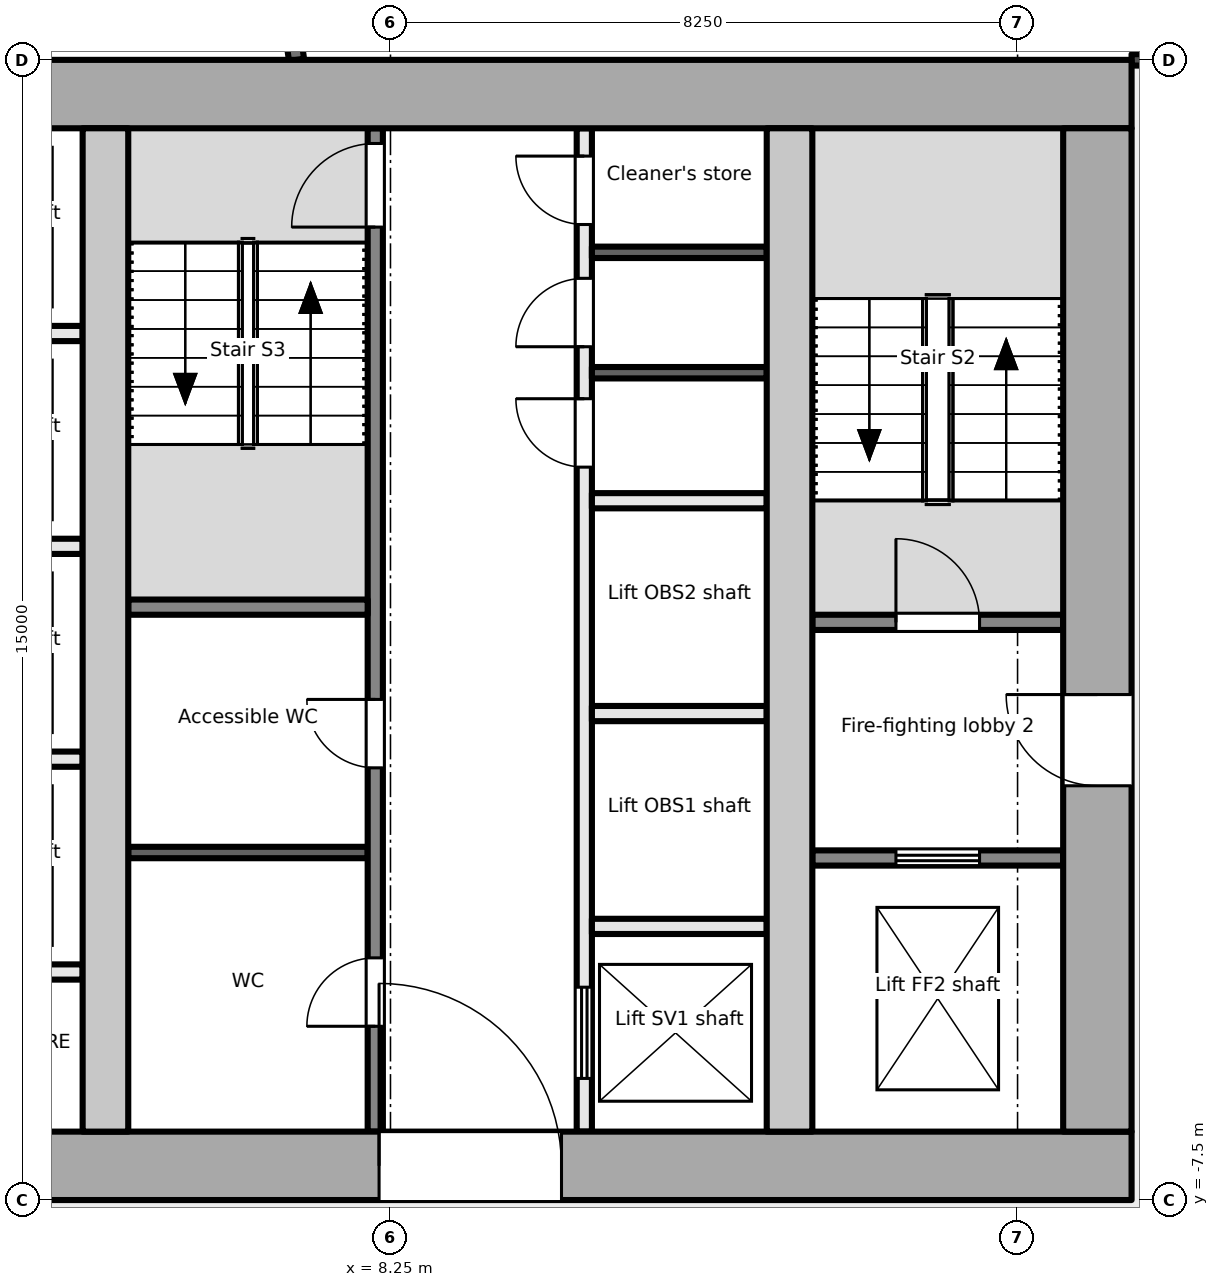
"""IFC4 building model, lengths in metres.
Left out: names, types, materials, properties, quantities, classifications, styles, units other than length and angle.
Written with IfcOpenShell. Run it as: python <this file> out.ifc"""

import sys

from ifc_helpers import new_model, si_unit, direction, frame, frame_2d, origin, place, context, subcontext, project, spatial, rectangle, extrude, element, fill, save


model = new_model("IFC4")
c1 = context("Model", 3, precision=1e-05, world=origin(), true_north=direction((0.0, 1.0)))
c2 = subcontext(c1, "Body", "Model", "MODEL_VIEW")
j1 = project(units=[si_unit("LENGTHUNIT", "METRE"), si_unit("PLANEANGLEUNIT", "RADIAN")], contexts=[c1])
p1 = place(None, origin())
s1 = spatial("IfcSite", under=j1, at=p1, CompositionType="ELEMENT")
p2 = place(p1, origin())
s2 = spatial("IfcBuilding", under=s1, at=p2, CompositionType="ELEMENT")
p3 = place(p2, frame((0.0, 0.0, 249.7)))
s3 = spatial("IfcBuildingStorey", under=s2, at=p3, CompositionType="ELEMENT", Elevation=249.7)
p4 = place(p3, frame((-18.0, -7.05, -0.2), z_axis=(0.0, 0.0, 1.0), x_axis=(1.0, 0.0, 0.0)))
e1 = element("IfcWall", 1, at=p4, inside=s3, PredefinedType="SHEAR", context=c2, shape_type="SweptSolid", body=[
    extrude(rectangle(XDim=36.0, YDim=0.9, at=frame_2d((18.0, 0.0))), origin(), (0.0, 0.0, 1.0), 5.4),
])
p5 = place(p4, frame((4.9, 0.0, 0.2)))
e2 = element("IfcOpeningElement", 2, at=p5, cuts=e1, PredefinedType="OPENING", context=c2, shape_type="SweptSolid", body=[
    extrude(rectangle(XDim=1.8, YDim=2.1, at=frame_2d((0.9, 1.05))), frame((0.0, 0.46, 0.0), z_axis=(0.0, -1.0, 0.0), x_axis=(1.0, 0.0, 0.0)), (0.0, 0.0, 1.0), 0.921),
])
p6 = place(p4, frame((16.8, 0.0, 0.2)))
e3 = element("IfcOpeningElement", 3, at=p6, cuts=e1, PredefinedType="OPENING", context=c2, shape_type="SweptSolid", body=[
    extrude(rectangle(XDim=2.4, YDim=2.1, at=frame_2d((1.2, 1.05))), frame((0.0, 0.46, 0.0), z_axis=(0.0, -1.0, 0.0), x_axis=(1.0, 0.0, 0.0)), (0.0, 0.0, 1.0), 0.921),
])
p7 = place(p4, frame((26.1, 0.0, 0.2)))
e4 = element("IfcOpeningElement", 4, at=p7, cuts=e1, PredefinedType="OPENING", context=c2, shape_type="SweptSolid", body=[
    extrude(rectangle(XDim=2.4, YDim=2.1, at=frame_2d((1.2, 1.05))), frame((0.0, 0.46, 0.0), z_axis=(0.0, -1.0, 0.0), x_axis=(1.0, 0.0, 0.0)), (0.0, 0.0, 1.0), 0.921),
])
p8 = place(p3, frame((-18.0, 7.05, -0.2), z_axis=(0.0, 0.0, 1.0), x_axis=(1.0, 0.0, 0.0)))
e5 = element("IfcWall", 5, at=p8, inside=s3, PredefinedType="SHEAR", context=c2, shape_type="SweptSolid", body=[
    extrude(rectangle(XDim=36.0, YDim=0.9, at=frame_2d((18.0, 0.0))), origin(), (0.0, 0.0, 1.0), 5.4),
])
p9 = place(p3, frame((17.55, -6.6, -0.2), z_axis=(0.0, 0.0, 1.0), x_axis=(0.0, 1.0, 0.0)))
e6 = element("IfcWall", 6, at=p9, inside=s3, PredefinedType="SHEAR", context=c2, shape_type="SweptSolid", body=[
    extrude(rectangle(XDim=13.2, YDim=0.9, at=frame_2d((6.6, 0.0))), origin(), (0.0, 0.0, 1.0), 5.4),
])
p10 = place(p9, frame((4.55, 0.0, 0.2)))
e7 = element("IfcOpeningElement", 7, at=p10, cuts=e6, PredefinedType="OPENING", context=c2, shape_type="SweptSolid", body=[
    extrude(rectangle(XDim=1.2, YDim=2.1, at=frame_2d((0.6, 1.05))), frame((0.0, 0.46, 0.0), z_axis=(0.0, -1.0, 0.0), x_axis=(1.0, 0.0, 0.0)), (0.0, 0.0, 1.0), 0.921),
])
for number, where, z_axis, x_axis in (
    (8, (4.5, -6.6, -0.2), (0.0, 0.0, 1.0), (0.0, 1.0, 0.0)),
    (9, (13.5, -6.6, -0.2), (0.0, 0.0, 1.0), (0.0, 1.0, 0.0)),
):
    element("IfcWall", number, at=place(p3, frame(where, z_axis=z_axis, x_axis=x_axis)), inside=s3, PredefinedType="SHEAR", context=c2, shape_type="SweptSolid", body=[
        extrude(rectangle(XDim=13.2, YDim=0.6, at=frame_2d((6.6, 0.0))), origin(), (0.0, 0.0, 1.0), 5.4),
    ])
p11 = place(p3, frame((13.8, -3.0, 0.0), z_axis=(0.0, 0.0, 1.0), x_axis=(1.0, 0.0, 0.0)))
e10 = element("IfcWall", 10, at=p11, inside=s3, PredefinedType="PARTITIONING", context=c2, shape_type="SweptSolid", body=[
    extrude(rectangle(XDim=3.3, YDim=0.2, at=frame_2d((1.65, 0.0))), origin(), (0.0, 0.0, 1.0), 5.2),
])
p12 = place(p11, frame((1.1, 0.0, 0.0)))
e11 = element("IfcOpeningElement", 11, at=p12, cuts=e10, PredefinedType="OPENING", context=c2, shape_type="SweptSolid", body=[
    extrude(rectangle(XDim=1.1, YDim=2.1, at=frame_2d((0.55, 1.05))), frame((0.0, 0.111, 0.0), z_axis=(0.0, -1.0, 0.0), x_axis=(1.0, 0.0, 0.0)), (0.0, 0.0, 1.0), 0.221),
])
p13 = place(p3, frame((13.8, 0.1, 0.0), z_axis=(0.0, 0.0, 1.0), x_axis=(1.0, 0.0, 0.0)))
e12 = element("IfcWall", 12, at=p13, inside=s3, PredefinedType="PARTITIONING", context=c2, shape_type="SweptSolid", body=[
    extrude(rectangle(XDim=3.3, YDim=0.2, at=frame_2d((1.65, 0.0))), origin(), (0.0, 0.0, 1.0), 5.2),
])
p14 = place(p13, frame((1.1, 0.0, 0.0)))
e13 = element("IfcOpeningElement", 13, at=p14, cuts=e12, PredefinedType="OPENING", context=c2, shape_type="SweptSolid", body=[
    extrude(rectangle(XDim=1.1, YDim=2.1, at=frame_2d((0.55, 1.05))), frame((0.0, 0.111, 0.0), z_axis=(0.0, -1.0, 0.0), x_axis=(1.0, 0.0, 0.0)), (0.0, 0.0, 1.0), 0.221),
])
for number, where, z_axis, x_axis in (
    (14, (1.9, -1.7, 0.0), (0.0, 0.0, 1.0), (1.0, 0.0, 0.0)),
    (15, (1.9, 1.1, 0.0), (0.0, 0.0, 1.0), (1.0, 0.0, 0.0)),
    (16, (1.9, 3.9, 0.0), (0.0, 0.0, 1.0), (1.0, 0.0, 0.0)),
    (17, (1.9, -4.5, 0.0), (0.0, 0.0, 1.0), (1.0, 0.0, 0.0)),
):
    element("IfcWall", number, at=place(p3, frame(where, z_axis=z_axis, x_axis=x_axis)), inside=s3, PredefinedType="PARTITIONING", context=c2, shape_type="SweptSolid", body=[
        extrude(rectangle(XDim=2.3, YDim=0.2, at=frame_2d((1.15, 0.0))), origin(), (0.0, 0.0, 1.0), 5.2),
    ])
p15 = place(p3, frame((8.05, -6.6, 0.0), z_axis=(0.0, 0.0, 1.0), x_axis=(0.0, 1.0, 0.0)))
e18 = element("IfcWall", 18, at=p15, inside=s3, PredefinedType="PARTITIONING", context=c2, shape_type="SweptSolid", body=[
    extrude(rectangle(XDim=13.2, YDim=0.2, at=frame_2d((6.6, 0.0))), origin(), (0.0, 0.0, 1.0), 5.2),
])
p16 = place(p15, frame((1.386, 0.0, 0.0)))
e19 = element("IfcOpeningElement", 19, at=p16, cuts=e18, PredefinedType="OPENING", context=c2, shape_type="SweptSolid", body=[
    extrude(rectangle(XDim=0.9, YDim=2.1, at=frame_2d((0.45, 1.05))), frame((0.0, 0.111, 0.0), z_axis=(0.0, -1.0, 0.0), x_axis=(1.0, 0.0, 0.0)), (0.0, 0.0, 1.0), 0.221),
])
p17 = place(p15, frame((4.786, 0.0, 0.0)))
e20 = element("IfcOpeningElement", 20, at=p17, cuts=e18, PredefinedType="OPENING", context=c2, shape_type="SweptSolid", body=[
    extrude(rectangle(XDim=0.9, YDim=2.1, at=frame_2d((0.45, 1.05))), frame((0.0, 0.111, 0.0), z_axis=(0.0, -1.0, 0.0), x_axis=(1.0, 0.0, 0.0)), (0.0, 0.0, 1.0), 0.221),
])
p18 = place(p15, frame((11.9, 0.0, 0.0)))
e21 = element("IfcOpeningElement", 21, at=p18, cuts=e18, PredefinedType="OPENING", context=c2, shape_type="SweptSolid", body=[
    extrude(rectangle(XDim=1.1, YDim=2.1, at=frame_2d((0.55, 1.05))), frame((0.0, 0.111, 0.0), z_axis=(0.0, -1.0, 0.0), x_axis=(1.0, 0.0, 0.0)), (0.0, 0.0, 1.0), 0.221),
])
p19 = place(p3, frame((10.8, -6.6, 0.0), z_axis=(0.0, 0.0, 1.0), x_axis=(0.0, 1.0, 0.0)))
e22 = element("IfcWall", 22, at=p19, inside=s3, PredefinedType="PARTITIONING", context=c2, shape_type="SweptSolid", body=[
    extrude(rectangle(XDim=13.2, YDim=0.2, at=frame_2d((6.6, 0.0))), origin(), (0.0, 0.0, 1.0), 5.2),
])
p20 = place(p19, frame((0.7, 0.0, 0.0)))
e23 = element("IfcOpeningElement", 23, at=p20, cuts=e22, PredefinedType="OPENING", context=c2, shape_type="SweptSolid", body=[
    extrude(rectangle(XDim=1.2, YDim=2.1, at=frame_2d((0.6, 1.05))), frame((0.0, 0.111, 0.0), z_axis=(0.0, -1.0, 0.0), x_axis=(1.0, 0.0, 0.0)), (0.0, 0.0, 1.0), 0.221),
])
p21 = place(p19, frame((8.742, 0.0, 0.0)))
e24 = element("IfcOpeningElement", 24, at=p21, cuts=e22, PredefinedType="OPENING", context=c2, shape_type="SweptSolid", body=[
    extrude(rectangle(XDim=0.9, YDim=2.1, at=frame_2d((0.45, 1.05))), frame((0.0, 0.111, 0.0), z_axis=(0.0, -1.0, 0.0), x_axis=(1.0, 0.0, 0.0)), (0.0, 0.0, 1.0), 0.221),
])
p22 = place(p19, frame((10.326, 0.0, 0.0)))
e25 = element("IfcOpeningElement", 25, at=p22, cuts=e22, PredefinedType="OPENING", context=c2, shape_type="SweptSolid", body=[
    extrude(rectangle(XDim=0.9, YDim=2.1, at=frame_2d((0.45, 1.05))), frame((0.0, 0.111, 0.0), z_axis=(0.0, -1.0, 0.0), x_axis=(1.0, 0.0, 0.0)), (0.0, 0.0, 1.0), 0.221),
])
p23 = place(p19, frame((11.934, 0.0, 0.0)))
e26 = element("IfcOpeningElement", 26, at=p23, cuts=e22, PredefinedType="OPENING", context=c2, shape_type="SweptSolid", body=[
    extrude(rectangle(XDim=0.9, YDim=2.1, at=frame_2d((0.45, 1.05))), frame((0.0, 0.111, 0.0), z_axis=(0.0, -1.0, 0.0), x_axis=(1.0, 0.0, 0.0)), (0.0, 0.0, 1.0), 0.221),
])
p24 = place(p3, frame((4.8, 0.3, 0.0), z_axis=(0.0, 0.0, 1.0), x_axis=(1.0, 0.0, 0.0)))
e27 = element("IfcWall", 27, at=p24, inside=s3, PredefinedType="PARTITIONING", context=c2, shape_type="SweptSolid", body=[
    extrude(rectangle(XDim=3.15, YDim=0.2, at=frame_2d((1.575, 0.0))), origin(), (0.0, 0.0, 1.0), 5.2),
])
p25 = place(p3, frame((4.8, -2.928, 0.0), z_axis=(0.0, 0.0, 1.0), x_axis=(1.0, 0.0, 0.0)))
e28 = element("IfcWall", 28, at=p25, inside=s3, PredefinedType="PARTITIONING", context=c2, shape_type="SweptSolid", body=[
    extrude(rectangle(XDim=3.15, YDim=0.15, at=frame_2d((1.575, 0.0))), origin(), (0.0, 0.0, 1.0), 5.2),
])
for number, where, z_axis, x_axis in (
    (29, (10.9, -3.9, 0.0), (0.0, 0.0, 1.0), (1.0, 0.0, 0.0)),
    (30, (10.9, -1.1, 0.0), (0.0, 0.0, 1.0), (1.0, 0.0, 0.0)),
    (31, (10.9, 1.7, 0.0), (0.0, 0.0, 1.0), (1.0, 0.0, 0.0)),
):
    element("IfcWall", number, at=place(p3, frame(where, z_axis=z_axis, x_axis=x_axis)), inside=s3, PredefinedType="PARTITIONING", context=c2, shape_type="SweptSolid", body=[
        extrude(rectangle(XDim=2.3, YDim=0.2, at=frame_2d((1.15, 0.0))), origin(), (0.0, 0.0, 1.0), 5.2),
    ])
for number, where, z_axis, x_axis in (
    (32, (10.9, 3.384, 0.0), (0.0, 0.0, 1.0), (1.0, 0.0, 0.0)),
    (33, (10.9, 4.968, 0.0), (0.0, 0.0, 1.0), (1.0, 0.0, 0.0)),
):
    element("IfcWall", number, at=place(p3, frame(where, z_axis=z_axis, x_axis=x_axis)), inside=s3, PredefinedType="PARTITIONING", context=c2, shape_type="SweptSolid", body=[
        extrude(rectangle(XDim=2.3, YDim=0.15, at=frame_2d((1.15, 0.0))), origin(), (0.0, 0.0, 1.0), 5.2),
    ])
p26 = place(p3, frame((18.0, 7.5, 0.0), z_axis=(0.0, 0.0, 1.0), x_axis=(1.0, 0.0, 0.0)))
e34 = element("IfcWall", 34, at=p26, inside=s3, PredefinedType="PARTITIONING", context=c2, shape_type="SweptSolid", body=[
    extrude(rectangle(XDim=3.225, YDim=0.15, at=frame_2d((1.613, 0.0))), origin(), (0.0, 0.0, 1.0), 5.2),
])
p27 = place(p26, frame((0.413, 0.0, 0.0)))
e35 = element("IfcOpeningElement", 35, at=p27, cuts=e34, PredefinedType="OPENING", context=c2, shape_type="SweptSolid", body=[
    extrude(rectangle(XDim=2.4, YDim=2.4, at=frame_2d((1.2, 1.2))), frame((0.0, 0.085, 0.0), z_axis=(0.0, -1.0, 0.0), x_axis=(1.0, 0.0, 0.0)), (0.0, 0.0, 1.0), 0.171),
])
p28 = place(p3, frame((7.014, 7.5, 0.0), z_axis=(0.0, 0.0, 1.0), x_axis=(-0.139161207558, 0.990269740177, 0.0)))
e36 = element("IfcWall", 36, at=p28, inside=s3, PredefinedType="PARTITIONING", context=c2, shape_type="SweptSolid", body=[
    extrude(rectangle(XDim=6.912, YDim=0.2, at=frame_2d((3.456, 0.0))), origin(), (0.0, 0.0, 1.0), 5.2),
])
p29 = place(p12, origin())
e37 = element("IfcDoor", 37, at=p29, inside=s3, OperationType="DOUBLE_DOOR_SLIDING", PredefinedType="DOOR", context=c2, shape_type="SweptSolid", body=[
    extrude(rectangle(XDim=1.1, YDim=2.1, at=frame_2d((0.55, 1.05))), frame((0.0, 0.025, 0.0), z_axis=(0.0, -1.0, 0.0), x_axis=(1.0, 0.0, 0.0)), (0.0, 0.0, 1.0), 0.05),
])
fill(e11, e37)
p30 = place(p10, origin())
e38 = element("IfcDoor", 38, at=p30, inside=s3, OperationType="SINGLE_SWING_RIGHT", PredefinedType="DOOR", context=c2, shape_type="SweptSolid", body=[
    extrude(rectangle(XDim=1.2, YDim=2.1, at=frame_2d((0.6, 1.05))), frame((0.0, 0.025, 0.0), z_axis=(0.0, -1.0, 0.0), x_axis=(1.0, 0.0, 0.0)), (0.0, 0.0, 1.0), 0.05),
])
fill(e7, e38)
p31 = place(p14, origin())
e39 = element("IfcDoor", 39, at=p31, inside=s3, OperationType="SINGLE_SWING_LEFT", PredefinedType="DOOR", context=c2, shape_type="SweptSolid", body=[
    extrude(rectangle(XDim=1.1, YDim=2.1, at=frame_2d((0.55, 1.05))), frame((0.0, 0.025, 0.0), z_axis=(0.0, -1.0, 0.0), x_axis=(1.0, 0.0, 0.0)), (0.0, 0.0, 1.0), 0.05),
])
fill(e13, e39)
p32 = place(p16, origin())
e40 = element("IfcDoor", 40, at=p32, inside=s3, OperationType="SINGLE_SWING_LEFT", PredefinedType="DOOR", context=c2, shape_type="SweptSolid", body=[
    extrude(rectangle(XDim=0.9, YDim=2.1, at=frame_2d((0.45, 1.05))), frame((0.0, 0.025, 0.0), z_axis=(0.0, -1.0, 0.0), x_axis=(1.0, 0.0, 0.0)), (0.0, 0.0, 1.0), 0.05),
])
fill(e19, e40)
p33 = place(p17, origin())
e41 = element("IfcDoor", 41, at=p33, inside=s3, OperationType="SINGLE_SWING_RIGHT", PredefinedType="DOOR", context=c2, shape_type="SweptSolid", body=[
    extrude(rectangle(XDim=0.9, YDim=2.1, at=frame_2d((0.45, 1.05))), frame((0.0, 0.025, 0.0), z_axis=(0.0, -1.0, 0.0), x_axis=(1.0, 0.0, 0.0)), (0.0, 0.0, 1.0), 0.05),
])
fill(e20, e41)
p34 = place(p18, origin())
e42 = element("IfcDoor", 42, at=p34, inside=s3, OperationType="SINGLE_SWING_LEFT", PredefinedType="DOOR", context=c2, shape_type="SweptSolid", body=[
    extrude(rectangle(XDim=1.1, YDim=2.1, at=frame_2d((0.55, 1.05))), frame((0.0, 0.025, 0.0), z_axis=(0.0, -1.0, 0.0), x_axis=(1.0, 0.0, 0.0)), (0.0, 0.0, 1.0), 0.05),
])
fill(e21, e42)
p35 = place(p7, origin())
e43 = element("IfcDoor", 43, at=p35, inside=s3, OperationType="DOUBLE_DOOR_DOUBLE_SWING", PredefinedType="DOOR", context=c2, shape_type="SweptSolid", body=[
    extrude(rectangle(XDim=2.4, YDim=2.1, at=frame_2d((1.2, 1.05))), frame((0.0, 0.025, 0.0), z_axis=(0.0, -1.0, 0.0), x_axis=(1.0, 0.0, 0.0)), (0.0, 0.0, 1.0), 0.05),
])
fill(e4, e43)
p36 = place(p20, origin())
e44 = element("IfcDoor", 44, at=p36, inside=s3, OperationType="DOUBLE_DOOR_SLIDING", PredefinedType="DOOR", context=c2, shape_type="SweptSolid", body=[
    extrude(rectangle(XDim=1.2, YDim=2.1, at=frame_2d((0.6, 1.05))), frame((0.0, 0.025, 0.0), z_axis=(0.0, -1.0, 0.0), x_axis=(1.0, 0.0, 0.0)), (0.0, 0.0, 1.0), 0.05),
])
fill(e23, e44)
p37 = place(p21, origin())
e45 = element("IfcDoor", 45, at=p37, inside=s3, OperationType="SINGLE_SWING_RIGHT", PredefinedType="DOOR", context=c2, shape_type="SweptSolid", body=[
    extrude(rectangle(XDim=0.9, YDim=2.1, at=frame_2d((0.45, 1.05))), frame((0.0, 0.025, 0.0), z_axis=(0.0, -1.0, 0.0), x_axis=(1.0, 0.0, 0.0)), (0.0, 0.0, 1.0), 0.05),
])
fill(e24, e45)
p38 = place(p22, origin())
e46 = element("IfcDoor", 46, at=p38, inside=s3, OperationType="SINGLE_SWING_LEFT", PredefinedType="DOOR", context=c2, shape_type="SweptSolid", body=[
    extrude(rectangle(XDim=0.9, YDim=2.1, at=frame_2d((0.45, 1.05))), frame((0.0, 0.025, 0.0), z_axis=(0.0, -1.0, 0.0), x_axis=(1.0, 0.0, 0.0)), (0.0, 0.0, 1.0), 0.05),
])
fill(e25, e46)
p39 = place(p23, origin())
e47 = element("IfcDoor", 47, at=p39, inside=s3, OperationType="SINGLE_SWING_RIGHT", PredefinedType="DOOR", context=c2, shape_type="SweptSolid", body=[
    extrude(rectangle(XDim=0.9, YDim=2.1, at=frame_2d((0.45, 1.05))), frame((0.0, 0.025, 0.0), z_axis=(0.0, -1.0, 0.0), x_axis=(1.0, 0.0, 0.0)), (0.0, 0.0, 1.0), 0.05),
])
fill(e26, e47)
save(model, sys.argv[1])
